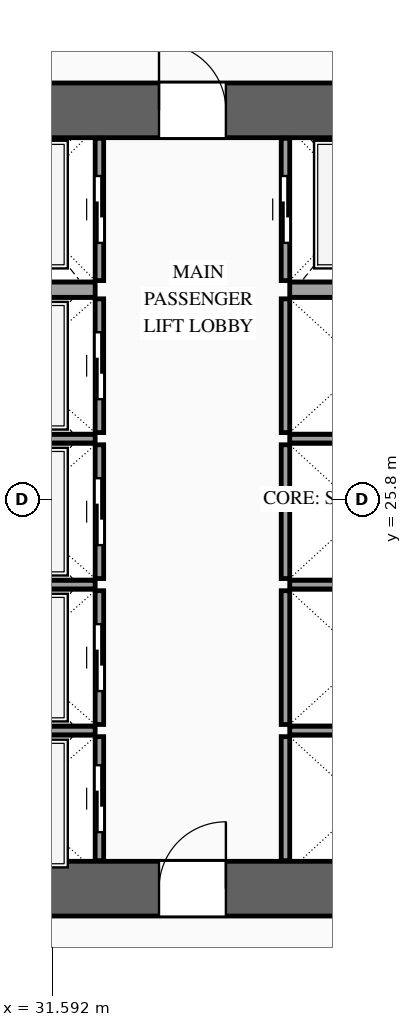
"""IFC4 building model, lengths in metres.
Left out: names, types, materials, properties, quantities, classifications, styles, units other than length and angle.
Written with IfcOpenShell. Run it as: python <this file> out.ifc"""

import sys

from ifc_helpers import new_model, si_unit, direction, frame, frame_2d, origin, place, context, subcontext, project, spatial, rectangle, extrude, source, transform, mapped, element, fill, save


model = new_model("IFC4")
c1 = context("Model", 3, precision=1e-05, world=origin(), true_north=direction((0.0, 1.0)))
c2 = subcontext(c1, "Body", "Model", "MODEL_VIEW")
j1 = project(units=[si_unit("LENGTHUNIT", "METRE"), si_unit("PLANEANGLEUNIT", "RADIAN")], contexts=[c1])
p1 = place(None, origin())
s1 = spatial("IfcSite", under=j1, at=p1, CompositionType="ELEMENT")
p2 = place(p1, origin())
s2 = spatial("IfcBuilding", under=s1, at=p2, CompositionType="ELEMENT")
p3 = place(p2, frame((0.0, 0.0, 41.4)))
s3 = spatial("IfcBuildingStorey", under=s2, at=p3, CompositionType="ELEMENT", Elevation=41.4)
p4 = place(p3, frame((23.35, 19.4, 0.0), z_axis=(0.0, 0.0, 1.0), x_axis=(1.0, 0.0, 0.0)))
e1 = element("IfcWall", 1, at=p4, inside=s3, PredefinedType="SHEAR", context=c2, shape_type="SweptSolid", body=[
    extrude(rectangle(XDim=27.3, YDim=0.9, at=frame_2d((13.65, 0.0))), origin(), (0.0, 0.0, 1.0), 4.6),
])
p5 = place(p4, frame((2.1, 0.0, 0.0)))
e2 = element("IfcOpeningElement", 2, at=p5, cuts=e1, PredefinedType="OPENING", context=c2, shape_type="SweptSolid", body=[
    extrude(rectangle(XDim=1.1, YDim=2.2, at=frame_2d((0.55, 1.1))), frame((0.0, 0.465, 0.0), z_axis=(0.0, -1.0, 0.0), x_axis=(1.0, 0.0, 0.0)), (0.0, 0.0, 1.0), 0.93),
])
p6 = place(p4, frame((10.0, 0.0, 0.0)))
e3 = element("IfcOpeningElement", 3, at=p6, cuts=e1, PredefinedType="OPENING", context=c2, shape_type="SweptSolid", body=[
    extrude(rectangle(XDim=1.1, YDim=2.2, at=frame_2d((0.55, 1.1))), frame((0.0, 0.465, 0.0), z_axis=(0.0, -1.0, 0.0), x_axis=(1.0, 0.0, 0.0)), (0.0, 0.0, 1.0), 0.93),
])
p7 = place(p4, frame((23.2, 0.0, 0.0)))
e4 = element("IfcOpeningElement", 4, at=p7, cuts=e1, PredefinedType="OPENING", context=c2, shape_type="SweptSolid", body=[
    extrude(rectangle(XDim=1.1, YDim=2.2, at=frame_2d((0.55, 1.1))), frame((0.0, 0.465, 0.0), z_axis=(0.0, -1.0, 0.0), x_axis=(1.0, 0.0, 0.0)), (0.0, 0.0, 1.0), 0.93),
])
p8 = place(p4, frame((19.82, 0.0, 0.0)))
e5 = element("IfcOpeningElement", 5, at=p8, cuts=e1, PredefinedType="OPENING", context=c2, shape_type="SweptSolid", body=[
    extrude(rectangle(XDim=0.9, YDim=2.15, at=frame_2d((0.45, 1.075))), frame((0.0, 0.465, 0.0), z_axis=(0.0, -1.0, 0.0), x_axis=(1.0, 0.0, 0.0)), (0.0, 0.0, 1.0), 0.93),
])
p9 = place(p3, frame((23.35, 32.2, 0.0), z_axis=(0.0, 0.0, 1.0), x_axis=(1.0, 0.0, 0.0)))
e6 = element("IfcWall", 6, at=p9, inside=s3, PredefinedType="SHEAR", context=c2, shape_type="SweptSolid", body=[
    extrude(rectangle(XDim=27.3, YDim=0.9, at=frame_2d((13.65, 0.0))), origin(), (0.0, 0.0, 1.0), 4.6),
])
p10 = place(p9, frame((4.72, 0.0, 0.0)))
e7 = element("IfcOpeningElement", 7, at=p10, cuts=e6, PredefinedType="OPENING", context=c2, shape_type="SweptSolid", body=[
    extrude(rectangle(XDim=0.9, YDim=2.15, at=frame_2d((0.45, 1.075))), frame((0.0, 0.465, 0.0), z_axis=(0.0, -1.0, 0.0), x_axis=(1.0, 0.0, 0.0)), (0.0, 0.0, 1.0), 0.93),
])
p11 = place(p9, frame((10.0, 0.0, 0.0)))
e8 = element("IfcOpeningElement", 8, at=p11, cuts=e6, PredefinedType="OPENING", context=c2, shape_type="SweptSolid", body=[
    extrude(rectangle(XDim=1.1, YDim=2.2, at=frame_2d((0.55, 1.1))), frame((0.0, 0.465, 0.0), z_axis=(0.0, -1.0, 0.0), x_axis=(1.0, 0.0, 0.0)), (0.0, 0.0, 1.0), 0.93),
])
p12 = place(p9, frame((15.85, 0.0, 0.0)))
e9 = element("IfcOpeningElement", 9, at=p12, cuts=e6, PredefinedType="OPENING", context=c2, shape_type="SweptSolid", body=[
    extrude(rectangle(XDim=1.1, YDim=2.2, at=frame_2d((0.55, 1.1))), frame((0.0, 0.465, 0.0), z_axis=(0.0, -1.0, 0.0), x_axis=(1.0, 0.0, 0.0)), (0.0, 0.0, 1.0), 0.93),
])
p13 = place(p9, frame((19.05, 0.0, 0.0)))
e10 = element("IfcOpeningElement", 10, at=p13, cuts=e6, PredefinedType="OPENING", context=c2, shape_type="SweptSolid", body=[
    extrude(rectangle(XDim=0.9, YDim=2.15, at=frame_2d((0.45, 1.075))), frame((0.0, 0.465, 0.0), z_axis=(0.0, -1.0, 0.0), x_axis=(1.0, 0.0, 0.0)), (0.0, 0.0, 1.0), 0.93),
])
p14 = place(p3, frame((32.37, 19.86, 0.0), z_axis=(0.0, 0.0, 1.0), x_axis=(0.0, 1.0, 0.0)))
e11 = element("IfcWall", 11, at=p14, inside=s3, PredefinedType="SOLIDWALL", context=c2, shape_type="SweptSolid", body=[
    extrude(rectangle(XDim=2.04, YDim=0.14, at=frame_2d((1.02, 0.0))), origin(), (0.0, 0.0, 1.0), 4.38),
])
p15 = place(p14, frame((0.47, 0.0, 0.0)))
e12 = element("IfcOpeningElement", 12, at=p15, cuts=e11, PredefinedType="OPENING", context=c2, shape_type="SweptSolid", body=[
    extrude(rectangle(XDim=1.1, YDim=2.2, at=frame_2d((0.55, 1.1))), frame((0.0, 0.085, 0.0), z_axis=(0.0, -1.0, 0.0), x_axis=(1.0, 0.0, 0.0)), (0.0, 0.0, 1.0), 0.17),
])
m1 = source(origin(), c2, "Body", "SweptSolid", [
    extrude(rectangle(XDim=2.5, YDim=0.14, at=frame_2d((1.25, 0.0))), origin(), (0.0, 0.0, 1.0), 4.38),
])
p16 = place(p3, frame((29.8, 22.0, 0.0), z_axis=(0.0, 0.0, 1.0), x_axis=(1.0, 0.0, 0.0)))
e13 = element("IfcWall", 13, at=p16, inside=s3, PredefinedType="SOLIDWALL", context=c2, shape_type="MappedRepresentation", body=[
    mapped(m1, transform((0.0, 0.0, 0.0), scale=1.0)),
])
p17 = place(p3, frame((32.37, 22.1, 0.0), z_axis=(0.0, 0.0, 1.0), x_axis=(0.0, 1.0, 0.0)))
e14 = element("IfcWall", 14, at=p17, inside=s3, PredefinedType="SOLIDWALL", context=c2, shape_type="SweptSolid", body=[
    extrude(rectangle(XDim=2.2, YDim=0.14, at=frame_2d((1.1, 0.0))), origin(), (0.0, 0.0, 1.0), 4.38),
])
p18 = place(p17, frame((0.55, 0.0, 0.0)))
e15 = element("IfcOpeningElement", 15, at=p18, cuts=e14, PredefinedType="OPENING", context=c2, shape_type="SweptSolid", body=[
    extrude(rectangle(XDim=1.1, YDim=2.2, at=frame_2d((0.55, 1.1))), frame((0.0, 0.085, 0.0), z_axis=(0.0, -1.0, 0.0), x_axis=(1.0, 0.0, 0.0)), (0.0, 0.0, 1.0), 0.17),
])
p19 = place(p3, frame((29.8, 24.4, 0.0), z_axis=(0.0, 0.0, 1.0), x_axis=(1.0, 0.0, 0.0)))
e16 = element("IfcWall", 16, at=p19, inside=s3, PredefinedType="SOLIDWALL", context=c2, shape_type="MappedRepresentation", body=[
    mapped(m1, transform((0.0, 0.0, 0.0), scale=1.0)),
])
p20 = place(p3, frame((32.37, 24.5, 0.0), z_axis=(0.0, 0.0, 1.0), x_axis=(0.0, 1.0, 0.0)))
e17 = element("IfcWall", 17, at=p20, inside=s3, PredefinedType="SOLIDWALL", context=c2, shape_type="SweptSolid", body=[
    extrude(rectangle(XDim=2.2, YDim=0.14, at=frame_2d((1.1, 0.0))), origin(), (0.0, 0.0, 1.0), 4.38),
])
p21 = place(p20, frame((0.55, 0.0, 0.0)))
e18 = element("IfcOpeningElement", 18, at=p21, cuts=e17, PredefinedType="OPENING", context=c2, shape_type="SweptSolid", body=[
    extrude(rectangle(XDim=1.1, YDim=2.2, at=frame_2d((0.55, 1.1))), frame((0.0, 0.085, 0.0), z_axis=(0.0, -1.0, 0.0), x_axis=(1.0, 0.0, 0.0)), (0.0, 0.0, 1.0), 0.17),
])
p22 = place(p3, frame((29.8, 26.8, 0.0), z_axis=(0.0, 0.0, 1.0), x_axis=(1.0, 0.0, 0.0)))
e19 = element("IfcWall", 19, at=p22, inside=s3, PredefinedType="SOLIDWALL", context=c2, shape_type="MappedRepresentation", body=[
    mapped(m1, transform((0.0, 0.0, 0.0), scale=1.0)),
])
p23 = place(p3, frame((32.37, 26.9, 0.0), z_axis=(0.0, 0.0, 1.0), x_axis=(0.0, 1.0, 0.0)))
e20 = element("IfcWall", 20, at=p23, inside=s3, PredefinedType="SOLIDWALL", context=c2, shape_type="SweptSolid", body=[
    extrude(rectangle(XDim=2.2, YDim=0.14, at=frame_2d((1.1, 0.0))), origin(), (0.0, 0.0, 1.0), 4.38),
])
p24 = place(p23, frame((0.55, 0.0, 0.0)))
e21 = element("IfcOpeningElement", 21, at=p24, cuts=e20, PredefinedType="OPENING", context=c2, shape_type="SweptSolid", body=[
    extrude(rectangle(XDim=1.1, YDim=2.2, at=frame_2d((0.55, 1.1))), frame((0.0, 0.085, 0.0), z_axis=(0.0, -1.0, 0.0), x_axis=(1.0, 0.0, 0.0)), (0.0, 0.0, 1.0), 0.17),
])
p25 = place(p3, frame((32.37, 29.4, 0.0), z_axis=(0.0, 0.0, 1.0), x_axis=(0.0, 1.0, 0.0)))
e22 = element("IfcWall", 22, at=p25, inside=s3, PredefinedType="SOLIDWALL", context=c2, shape_type="SweptSolid", body=[
    extrude(rectangle(XDim=2.34, YDim=0.14, at=frame_2d((1.17, 0.0))), origin(), (0.0, 0.0, 1.0), 4.38),
])
p26 = place(p25, frame((0.62, 0.0, 0.0)))
e23 = element("IfcOpeningElement", 23, at=p26, cuts=e22, PredefinedType="OPENING", context=c2, shape_type="SweptSolid", body=[
    extrude(rectangle(XDim=1.1, YDim=2.2, at=frame_2d((0.55, 1.1))), frame((0.0, 0.085, 0.0), z_axis=(0.0, -1.0, 0.0), x_axis=(1.0, 0.0, 0.0)), (0.0, 0.0, 1.0), 0.17),
])
m2 = source(origin(), c2, "Body", "SweptSolid", [
    extrude(rectangle(XDim=2.5, YDim=0.25, at=frame_2d((1.25, 0.0))), origin(), (0.0, 0.0, 1.0), 4.38),
])
p27 = place(p3, frame((29.8, 29.25, 0.0), z_axis=(0.0, 0.0, 1.0), x_axis=(1.0, 0.0, 0.0)))
e24 = element("IfcWall", 24, at=p27, inside=s3, PredefinedType="SOLIDWALL", context=c2, shape_type="MappedRepresentation", body=[
    mapped(m2, transform((0.0, 0.0, 0.0), scale=1.0)),
])
m3 = source(origin(), c2, "Body", "SweptSolid", [
    extrude(rectangle(XDim=2.04, YDim=0.14, at=frame_2d((1.02, 0.0))), origin(), (0.0, 0.0, 1.0), 4.38),
])
p28 = place(p3, frame((35.43, 19.86, 0.0), z_axis=(0.0, 0.0, 1.0), x_axis=(0.0, 1.0, 0.0)))
e25 = element("IfcWall", 25, at=p28, inside=s3, PredefinedType="SOLIDWALL", context=c2, shape_type="MappedRepresentation", body=[
    mapped(m3, transform((0.0, 0.0, 0.0), scale=1.0)),
])
m4 = source(origin(), c2, "Body", "SweptSolid", [
    extrude(rectangle(XDim=2.4, YDim=0.14, at=frame_2d((1.2, 0.0))), origin(), (0.0, 0.0, 1.0), 4.38),
])
p29 = place(p3, frame((35.5, 22.0, 0.0), z_axis=(0.0, 0.0, 1.0), x_axis=(1.0, 0.0, 0.0)))
e26 = element("IfcWall", 26, at=p29, inside=s3, PredefinedType="SOLIDWALL", context=c2, shape_type="MappedRepresentation", body=[
    mapped(m4, transform((0.0, 0.0, 0.0), scale=1.0)),
])
m5 = source(origin(), c2, "Body", "SweptSolid", [
    extrude(rectangle(XDim=2.2, YDim=0.14, at=frame_2d((1.1, 0.0))), origin(), (0.0, 0.0, 1.0), 4.38),
])
p30 = place(p3, frame((35.43, 22.1, 0.0), z_axis=(0.0, 0.0, 1.0), x_axis=(0.0, 1.0, 0.0)))
e27 = element("IfcWall", 27, at=p30, inside=s3, PredefinedType="SOLIDWALL", context=c2, shape_type="MappedRepresentation", body=[
    mapped(m5, transform((0.0, 0.0, 0.0), scale=1.0)),
])
p31 = place(p3, frame((35.5, 24.4, 0.0), z_axis=(0.0, 0.0, 1.0), x_axis=(1.0, 0.0, 0.0)))
e28 = element("IfcWall", 28, at=p31, inside=s3, PredefinedType="SOLIDWALL", context=c2, shape_type="MappedRepresentation", body=[
    mapped(m4, transform((0.0, 0.0, 0.0), scale=1.0)),
])
p32 = place(p3, frame((35.43, 24.5, 0.0), z_axis=(0.0, 0.0, 1.0), x_axis=(0.0, 1.0, 0.0)))
e29 = element("IfcWall", 29, at=p32, inside=s3, PredefinedType="SOLIDWALL", context=c2, shape_type="MappedRepresentation", body=[
    mapped(m5, transform((0.0, 0.0, 0.0), scale=1.0)),
])
p33 = place(p3, frame((35.5, 26.8, 0.0), z_axis=(0.0, 0.0, 1.0), x_axis=(1.0, 0.0, 0.0)))
e30 = element("IfcWall", 30, at=p33, inside=s3, PredefinedType="SOLIDWALL", context=c2, shape_type="MappedRepresentation", body=[
    mapped(m4, transform((0.0, 0.0, 0.0), scale=1.0)),
])
m6 = source(origin(), c2, "Body", "SweptSolid", [
    extrude(rectangle(XDim=2.2, YDim=0.14, at=frame_2d((1.1, 0.0))), origin(), (0.0, 0.0, 1.0), 4.38),
])
p34 = place(p3, frame((35.43, 26.9, 0.0), z_axis=(0.0, 0.0, 1.0), x_axis=(0.0, 1.0, 0.0)))
e31 = element("IfcWall", 31, at=p34, inside=s3, PredefinedType="SOLIDWALL", context=c2, shape_type="MappedRepresentation", body=[
    mapped(m6, transform((0.0, 0.0, 0.0), scale=1.0)),
])
p35 = place(p3, frame((35.43, 29.4, 0.0), z_axis=(0.0, 0.0, 1.0), x_axis=(0.0, 1.0, 0.0)))
e32 = element("IfcWall", 32, at=p35, inside=s3, PredefinedType="SOLIDWALL", context=c2, shape_type="SweptSolid", body=[
    extrude(rectangle(XDim=2.34, YDim=0.14, at=frame_2d((1.17, 0.0))), origin(), (0.0, 0.0, 1.0), 4.38),
])
p36 = place(p35, frame((0.62, 0.0, 0.0)))
e33 = element("IfcOpeningElement", 33, at=p36, cuts=e32, PredefinedType="OPENING", context=c2, shape_type="SweptSolid", body=[
    extrude(rectangle(XDim=1.1, YDim=2.2, at=frame_2d((0.55, 1.1))), frame((0.0, 0.085, 0.0), z_axis=(0.0, -1.0, 0.0), x_axis=(1.0, 0.0, 0.0)), (0.0, 0.0, 1.0), 0.17),
])
m7 = source(origin(), c2, "Body", "SweptSolid", [
    extrude(rectangle(XDim=2.4, YDim=0.25, at=frame_2d((1.2, 0.0))), origin(), (0.0, 0.0, 1.0), 4.38),
])
p37 = place(p3, frame((35.5, 29.25, 0.0), z_axis=(0.0, 0.0, 1.0), x_axis=(1.0, 0.0, 0.0)))
e34 = element("IfcWall", 34, at=p37, inside=s3, PredefinedType="SOLIDWALL", context=c2, shape_type="MappedRepresentation", body=[
    mapped(m7, transform((0.0, 0.0, 0.0), scale=1.0)),
])
m8 = source(origin(), c2, "Body", "SweptSolid", [
    extrude(rectangle(XDim=1.1, YDim=2.2, at=frame_2d((0.55, 1.1))), frame((0.0, 0.025, 0.0), z_axis=(0.0, -1.0, 0.0), x_axis=(1.0, 0.0, 0.0)), (0.0, 0.0, 1.0), 0.05),
])
p38 = place(p15, origin())
e35 = element("IfcDoor", 35, at=p38, inside=s3, OperationType="SLIDING_TO_LEFT", PredefinedType="DOOR", context=c2, shape_type="MappedRepresentation", body=[
    mapped(m8, transform((0.0, 0.0, 0.0), scale=1.0)),
])
fill(e12, e35)
p39 = place(p18, origin())
e36 = element("IfcDoor", 36, at=p39, inside=s3, OperationType="SLIDING_TO_RIGHT", PredefinedType="DOOR", context=c2, shape_type="MappedRepresentation", body=[
    mapped(m8, transform((0.0, 0.0, 0.0), scale=1.0)),
])
fill(e15, e36)
p40 = place(p21, origin())
e37 = element("IfcDoor", 37, at=p40, inside=s3, OperationType="SLIDING_TO_LEFT", PredefinedType="DOOR", context=c2, shape_type="MappedRepresentation", body=[
    mapped(m8, transform((0.0, 0.0, 0.0), scale=1.0)),
])
fill(e18, e37)
p41 = place(p24, origin())
e38 = element("IfcDoor", 38, at=p41, inside=s3, OperationType="SLIDING_TO_RIGHT", PredefinedType="DOOR", context=c2, shape_type="MappedRepresentation", body=[
    mapped(m8, transform((0.0, 0.0, 0.0), scale=1.0)),
])
fill(e21, e38)
p42 = place(p26, origin())
e39 = element("IfcDoor", 39, at=p42, inside=s3, OperationType="SLIDING_TO_LEFT", PredefinedType="DOOR", context=c2, shape_type="MappedRepresentation", body=[
    mapped(m8, transform((0.0, 0.0, 0.0), scale=1.0)),
])
fill(e23, e39)
p43 = place(p36, origin())
e40 = element("IfcDoor", 40, at=p43, inside=s3, OperationType="SLIDING_TO_RIGHT", PredefinedType="DOOR", context=c2, shape_type="MappedRepresentation", body=[
    mapped(m8, transform((0.0, 0.0, 0.0), scale=1.0)),
])
fill(e33, e40)
m9 = source(origin(), c2, "Body", "SweptSolid", [
    extrude(rectangle(XDim=1.1, YDim=2.2, at=frame_2d((0.55, 1.1))), frame((0.0, 0.025, 0.0), z_axis=(0.0, -1.0, 0.0), x_axis=(1.0, 0.0, 0.0)), (0.0, 0.0, 1.0), 0.05),
])
p44 = place(p6, origin())
e41 = element("IfcDoor", 41, at=p44, inside=s3, OperationType="SINGLE_SWING_RIGHT", PredefinedType="DOOR", context=c2, shape_type="MappedRepresentation", body=[
    mapped(m9, transform((0.0, 0.0, 0.0), scale=1.0)),
])
fill(e3, e41)
p45 = place(p11, origin())
e42 = element("IfcDoor", 42, at=p45, inside=s3, OperationType="SINGLE_SWING_LEFT", PredefinedType="DOOR", context=c2, shape_type="MappedRepresentation", body=[
    mapped(m9, transform((0.0, 0.0, 0.0), scale=1.0)),
])
fill(e8, e42)
save(model, sys.argv[1])
